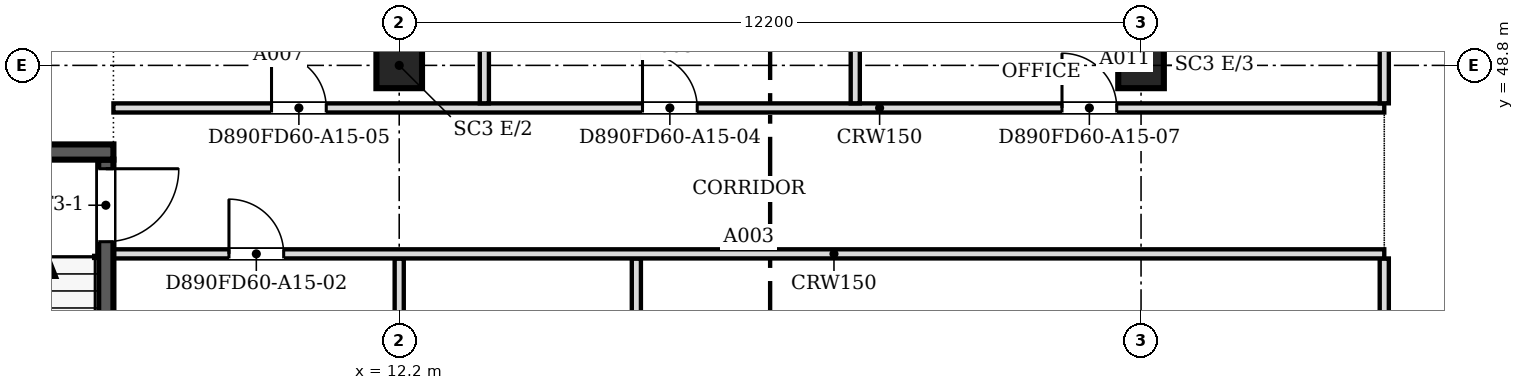
"""IFC4 building model, lengths in metres.
Left out: names, types, materials, properties, quantities, classifications, styles, units other than length and angle.
Written with IfcOpenShell. Run it as: python <this file> out.ifc"""

import sys

from ifc_helpers import new_model, si_unit, direction, frame, frame_2d, origin, origin_2d, place, context, subcontext, project, spatial, rectangle, extrude, source, transform, mapped, element, fill, save


model = new_model("IFC4")
c1 = context("Model", 3, precision=1e-05, world=origin(), true_north=direction((0.0, 1.0)))
c2 = subcontext(c1, "Body", "Model", "MODEL_VIEW")
j1 = project(units=[si_unit("LENGTHUNIT", "METRE"), si_unit("PLANEANGLEUNIT", "RADIAN")], contexts=[c1])
p1 = place(None, origin())
s1 = spatial("IfcSite", under=j1, at=p1, CompositionType="ELEMENT")
p2 = place(p1, origin())
s2 = spatial("IfcBuilding", under=s1, at=p2, CompositionType="ELEMENT")
p3 = place(p2, frame((0.0, 0.0, 170.6)))
s3 = spatial("IfcBuildingStorey", under=s2, at=p3, CompositionType="ELEMENT", Elevation=170.6)
for number, where, z_axis, x_axis in (
    (1, (12.2, 48.8, 0.0), (0.0, 0.0, 1.0), (1.0, 0.0, 0.0)),
    (2, (24.4, 48.8, 0.0), (0.0, 0.0, 1.0), (1.0, 0.0, 0.0)),
):
    element("IfcColumn", number, at=place(p3, frame(where, z_axis=z_axis, x_axis=x_axis)), inside=s3, PredefinedType="COLUMN", context=c2, shape_type="SweptSolid", body=[
        extrude(rectangle(XDim=0.75, YDim=0.75, at=origin_2d()), origin(), (0.0, 0.0, 1.0), 3.6),
    ])
p4 = place(p3, frame((3.6, 47.375, 0.0), z_axis=(0.0, 0.0, 1.0), x_axis=(1.0, 0.0, 0.0)))
e3 = element("IfcWall", 3, at=p4, inside=s3, PredefinedType="SOLIDWALL", context=c2, shape_type="SweptSolid", body=[
    extrude(rectangle(XDim=3.9, YDim=0.25, at=frame_2d((1.95, 0.0))), origin(), (0.0, 0.0, 1.0), 3.8),
])
p5 = place(p3, frame((7.375, 47.25, 0.0), z_axis=(0.0, 0.0, 1.0), x_axis=(0.0, -1.0, 0.0)))
e4 = element("IfcWall", 4, at=p5, inside=s3, PredefinedType="SOLIDWALL", context=c2, shape_type="SweptSolid", body=[
    extrude(rectangle(XDim=8.0, YDim=0.25, at=frame_2d((4.0, 0.0))), origin(), (0.0, 0.0, 1.0), 3.8),
])
m1 = source(origin(), c2, "Body", "SweptSolid", [
    extrude(rectangle(XDim=1.2, YDim=2.1, at=frame_2d((0.6, 1.05))), frame((0.0, 0.135, 0.0), z_axis=(0.0, -1.0, 0.0), x_axis=(1.0, 0.0, 0.0)), (0.0, 0.0, 1.0), 0.27),
])
p6 = place(p5, frame((0.15, 0.0, 0.0)))
e5 = element("IfcOpeningElement", 5, at=p6, cuts=e4, PredefinedType="OPENING", context=c2, shape_type="MappedRepresentation", body=[
    mapped(m1, transform((0.0, 0.0, 0.0), scale=1.0)),
])
p7 = place(p3, frame((28.4, 18.8, 0.0), z_axis=(0.0, 0.0, 1.0), x_axis=(0.0, 1.0, 0.0)))
e6 = element("IfcWall", 6, at=p7, inside=s3, PredefinedType="PARTITIONING", context=c2, shape_type="SweptSolid", body=[
    extrude(rectangle(XDim=26.824, YDim=0.15, at=frame_2d((13.412, 0.0))), origin(), (0.0, 0.0, 1.0), 3.067),
])
m2 = source(origin(), c2, "Body", "SweptSolid", [
    extrude(rectangle(XDim=0.9, YDim=2.1, at=frame_2d((0.45, 1.05))), frame((0.0, 0.085, 0.0), z_axis=(0.0, -1.0, 0.0), x_axis=(1.0, 0.0, 0.0)), (0.0, 0.0, 1.0), 0.17),
])
p8 = place(p7, frame((1.3, 0.0, 0.0)))
e7 = element("IfcOpeningElement", 7, at=p8, cuts=e6, PredefinedType="OPENING", context=c2, shape_type="MappedRepresentation", body=[
    mapped(m2, transform((0.0, 0.0, 0.0), scale=1.0)),
])
m3 = source(origin(), c2, "Body", "SweptSolid", [
    extrude(rectangle(XDim=1.0, YDim=2.1, at=frame_2d((0.5, 1.05))), frame((0.0, 0.085, 0.0), z_axis=(0.0, -1.0, 0.0), x_axis=(1.0, 0.0, 0.0)), (0.0, 0.0, 1.0), 0.17),
])
p9 = place(p7, frame((23.351, 0.0, 0.0)))
e8 = element("IfcOpeningElement", 8, at=p9, cuts=e6, PredefinedType="OPENING", context=c2, shape_type="MappedRepresentation", body=[
    mapped(m3, transform((0.0, 0.0, 0.0), scale=1.0)),
])
p10 = place(p7, frame((8.1, 0.0, 0.0)))
e9 = element("IfcOpeningElement", 9, at=p10, cuts=e6, PredefinedType="OPENING", context=c2, shape_type="MappedRepresentation", body=[
    mapped(m3, transform((0.0, 0.0, 0.0), scale=1.0)),
])
p11 = place(p7, frame((15.8, 0.0, 0.0)))
e10 = element("IfcOpeningElement", 10, at=p11, cuts=e6, PredefinedType="OPENING", context=c2, shape_type="MappedRepresentation", body=[
    mapped(m2, transform((0.0, 0.0, 0.0), scale=1.0)),
])
p12 = place(p3, frame((16.1, 39.65, 0.0), z_axis=(0.0, 0.0, 1.0), x_axis=(0.0, 1.0, 0.0)))
e11 = element("IfcWall", 11, at=p12, inside=s3, PredefinedType="PARTITIONING", context=c2, shape_type="SweptSolid", body=[
    extrude(rectangle(XDim=5.974, YDim=0.15, at=frame_2d((2.987, 0.0))), origin(), (0.0, 0.0, 1.0), 3.067),
])
p13 = place(p12, frame((2.5, 0.0, 0.0)))
e12 = element("IfcOpeningElement", 12, at=p13, cuts=e11, PredefinedType="OPENING", context=c2, shape_type="MappedRepresentation", body=[
    mapped(m2, transform((0.0, 0.0, 0.0), scale=1.0)),
])
p14 = place(p3, frame((12.2, 39.726, 0.0), z_axis=(0.0, 0.0, 1.0), x_axis=(0.0, 1.0, 0.0)))
e13 = element("IfcWall", 13, at=p14, inside=s3, PredefinedType="PARTITIONING", context=c2, shape_type="SweptSolid", body=[
    extrude(rectangle(XDim=5.898, YDim=0.15, at=frame_2d((2.949, 0.0))), origin(), (0.0, 0.0, 1.0), 3.067),
])
p15 = place(p3, frame((28.4, 45.7, 0.0), z_axis=(0.0, 0.0, 1.0), x_axis=(-1.0, 0.0, 0.0)))
e14 = element("IfcWall", 14, at=p15, inside=s3, PredefinedType="PARTITIONING", context=c2, shape_type="SweptSolid", body=[
    extrude(rectangle(XDim=20.9, YDim=0.15, at=frame_2d((10.45, 0.0))), origin(), (0.0, 0.0, 1.0), 3.067),
])
p16 = place(p15, frame((18.1, 0.0, 0.0)))
e15 = element("IfcOpeningElement", 15, at=p16, cuts=e14, PredefinedType="OPENING", context=c2, shape_type="MappedRepresentation", body=[
    mapped(m2, transform((0.0, 0.0, 0.0), scale=1.0)),
])
p17 = place(p3, frame((7.5, 48.1, 0.0), z_axis=(0.0, 0.0, 1.0), x_axis=(1.0, 0.0, 0.0)))
e16 = element("IfcWall", 16, at=p17, inside=s3, PredefinedType="PARTITIONING", context=c2, shape_type="SweptSolid", body=[
    extrude(rectangle(XDim=20.9, YDim=0.15, at=frame_2d((10.45, 0.0))), origin(), (0.0, 0.0, 1.0), 3.067),
])
p18 = place(p17, frame((8.701, 0.0, 0.0)))
e17 = element("IfcOpeningElement", 17, at=p18, cuts=e16, PredefinedType="OPENING", context=c2, shape_type="MappedRepresentation", body=[
    mapped(m2, transform((0.0, 0.0, 0.0), scale=1.0)),
])
p19 = place(p17, frame((2.6, 0.0, 0.0)))
e18 = element("IfcOpeningElement", 18, at=p19, cuts=e16, PredefinedType="OPENING", context=c2, shape_type="MappedRepresentation", body=[
    mapped(m2, transform((0.0, 0.0, 0.0), scale=1.0)),
])
p20 = place(p17, frame((15.6, 0.0, 0.0)))
e19 = element("IfcOpeningElement", 19, at=p20, cuts=e16, PredefinedType="OPENING", context=c2, shape_type="MappedRepresentation", body=[
    mapped(m2, transform((0.0, 0.0, 0.0), scale=1.0)),
])
p21 = place(p3, frame((13.6, 48.176, 0.0), z_axis=(0.0, 0.0, 1.0), x_axis=(0.0, 1.0, 0.0)))
e20 = element("IfcWall", 20, at=p21, inside=s3, PredefinedType="PARTITIONING", context=c2, shape_type="SweptSolid", body=[
    extrude(rectangle(XDim=2.924, YDim=0.15, at=frame_2d((1.462, 0.0))), origin(), (0.0, 0.0, 1.0), 3.067),
])
p22 = place(p3, frame((19.7, 48.176, 0.0), z_axis=(0.0, 0.0, 1.0), x_axis=(0.0, 1.0, 0.0)))
e21 = element("IfcWall", 21, at=p22, inside=s3, PredefinedType="PARTITIONING", context=c2, shape_type="SweptSolid", body=[
    extrude(rectangle(XDim=6.224, YDim=0.15, at=frame_2d((3.112, 0.0))), origin(), (0.0, 0.0, 1.0), 3.067),
])
p23 = place(p3, frame((28.4, 48.176, 0.0), z_axis=(0.0, 0.0, 1.0), x_axis=(0.0, 1.0, 0.0)))
e22 = element("IfcWall", 22, at=p23, inside=s3, PredefinedType="PARTITIONING", context=c2, shape_type="SweptSolid", body=[
    extrude(rectangle(XDim=2.549, YDim=0.15, at=frame_2d((1.274, 0.0))), origin(), (0.0, 0.0, 1.0), 3.067),
])
m4 = source(origin(), c2, "Body", "SweptSolid", [
    extrude(rectangle(XDim=1.2, YDim=2.1, at=frame_2d((0.6, 1.05))), frame((0.0, 0.025, 0.0), z_axis=(0.0, -1.0, 0.0), x_axis=(1.0, 0.0, 0.0)), (0.0, 0.0, 1.0), 0.05),
])
p24 = place(p6, origin())
e23 = element("IfcDoor", 23, at=p24, inside=s3, OperationType="SINGLE_SWING_LEFT", PredefinedType="DOOR", context=c2, shape_type="MappedRepresentation", body=[
    mapped(m4, transform((0.0, 0.0, 0.0), scale=1.0)),
])
fill(e5, e23)
m5 = source(origin(), c2, "Body", "SweptSolid", [
    extrude(rectangle(XDim=0.9, YDim=2.1, at=frame_2d((0.45, 1.05))), frame((0.0, 0.025, 0.0), z_axis=(0.0, -1.0, 0.0), x_axis=(1.0, 0.0, 0.0)), (0.0, 0.0, 1.0), 0.05),
])
p25 = place(p16, origin())
e24 = element("IfcDoor", 24, at=p25, inside=s3, OperationType="SINGLE_SWING_RIGHT", PredefinedType="DOOR", context=c2, shape_type="MappedRepresentation", body=[
    mapped(m5, transform((0.0, 0.0, 0.0), scale=1.0)),
])
fill(e15, e24)
p26 = place(p18, origin())
e25 = element("IfcDoor", 25, at=p26, inside=s3, OperationType="SINGLE_SWING_LEFT", PredefinedType="DOOR", context=c2, shape_type="MappedRepresentation", body=[
    mapped(m5, transform((0.0, 0.0, 0.0), scale=1.0)),
])
fill(e17, e25)
p27 = place(p19, origin())
e26 = element("IfcDoor", 26, at=p27, inside=s3, OperationType="SINGLE_SWING_LEFT", PredefinedType="DOOR", context=c2, shape_type="MappedRepresentation", body=[
    mapped(m5, transform((0.0, 0.0, 0.0), scale=1.0)),
])
fill(e18, e26)
p28 = place(p20, origin())
e27 = element("IfcDoor", 27, at=p28, inside=s3, OperationType="SINGLE_SWING_LEFT", PredefinedType="DOOR", context=c2, shape_type="MappedRepresentation", body=[
    mapped(m5, transform((0.0, 0.0, 0.0), scale=1.0)),
])
fill(e19, e27)
save(model, sys.argv[1])
